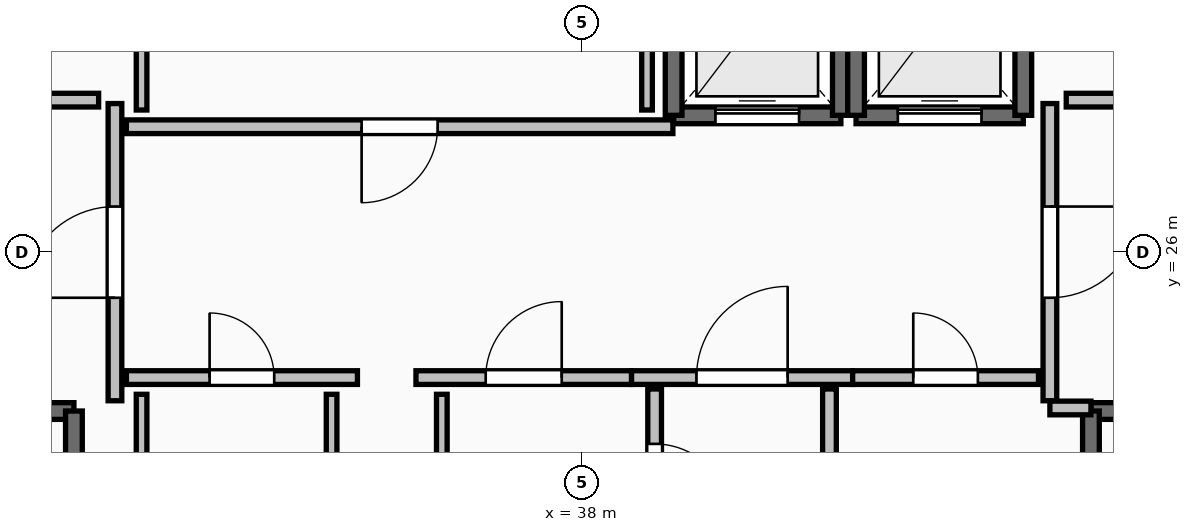
"""IFC4 building model, lengths in metres.
Left out: names, types, materials, properties, quantities, classifications, styles, units other than length and angle.
Written with IfcOpenShell. Run it as: python <this file> out.ifc"""

import sys

from ifc_helpers import new_model, si_unit, direction, frame, frame_2d, origin, place, context, subcontext, project, spatial, rectangle, extrude, element, fill, save


model = new_model("IFC4")
c1 = context("Model", 3, precision=1e-05, world=origin(), true_north=direction((0.0, 1.0)))
c2 = subcontext(c1, "Body", "Model", "MODEL_VIEW")
j1 = project(units=[si_unit("LENGTHUNIT", "METRE"), si_unit("PLANEANGLEUNIT", "RADIAN")], contexts=[c1])
p1 = place(None, origin())
s1 = spatial("IfcSite", under=j1, at=p1, CompositionType="ELEMENT")
p2 = place(p1, origin())
s2 = spatial("IfcBuilding", under=s1, at=p2, CompositionType="ELEMENT")
p3 = place(p2, frame((0.0, 0.0, 266.2)))
s3 = spatial("IfcBuildingStorey", under=s2, at=p3, CompositionType="ELEMENT", Elevation=266.2)
p4 = place(p3, frame((27.94, 23.91, 0.0), z_axis=(0.0, 0.0, 1.0), x_axis=(1.0, 0.0, 0.0)))
e1 = element("IfcWall", 1, at=p4, inside=s3, PredefinedType="SOLIDWALL", context=c2, shape_type="SweptSolid", body=[
    extrude(rectangle(XDim=3.37, YDim=0.22, at=frame_2d((1.685, 0.0))), origin(), (0.0, 0.0, 1.0), 3.29),
])
p5 = place(p4, frame((1.135, 0.0, 0.0)))
e2 = element("IfcOpeningElement", 2, at=p5, cuts=e1, PredefinedType="OPENING", context=c2, shape_type="SweptSolid", body=[
    extrude(rectangle(XDim=1.1, YDim=2.15, at=frame_2d((0.55, 1.075))), frame((0.0, 0.125, 0.0), z_axis=(0.0, -1.0, 0.0), x_axis=(1.0, 0.0, 0.0)), (0.0, 0.0, 1.0), 0.25),
])
p6 = place(p3, frame((31.31, 23.91, 0.0), z_axis=(0.0, 0.0, 1.0), x_axis=(0.0, -1.0, 0.0)))
e3 = element("IfcWall", 3, at=p6, inside=s3, PredefinedType="SOLIDWALL", context=c2, shape_type="SweptSolid", body=[
    extrude(rectangle(XDim=7.42, YDim=0.22, at=frame_2d((3.71, 0.0))), origin(), (0.0, 0.0, 1.0), 3.29),
])
p7 = place(p3, frame((44.69, 23.91, 0.0), z_axis=(0.0, 0.0, 1.0), x_axis=(1.0, 0.0, 0.0)))
e4 = element("IfcWall", 4, at=p7, inside=s3, PredefinedType="SOLIDWALL", context=c2, shape_type="SweptSolid", body=[
    extrude(rectangle(XDim=3.37, YDim=0.22, at=frame_2d((1.685, 0.0))), origin(), (0.0, 0.0, 1.0), 3.29),
])
p8 = place(p7, frame((1.135, 0.0, 0.0)))
e5 = element("IfcOpeningElement", 5, at=p8, cuts=e4, PredefinedType="OPENING", context=c2, shape_type="SweptSolid", body=[
    extrude(rectangle(XDim=1.1, YDim=2.15, at=frame_2d((0.55, 1.075))), frame((0.0, 0.125, 0.0), z_axis=(0.0, -1.0, 0.0), x_axis=(1.0, 0.0, 0.0)), (0.0, 0.0, 1.0), 0.25),
])
p9 = place(p3, frame((44.69, 16.49, 0.0), z_axis=(0.0, 0.0, 1.0), x_axis=(0.0, 1.0, 0.0)))
e6 = element("IfcWall", 6, at=p9, inside=s3, PredefinedType="SOLIDWALL", context=c2, shape_type="SweptSolid", body=[
    extrude(rectangle(XDim=7.42, YDim=0.22, at=frame_2d((3.71, 0.0))), origin(), (0.0, 0.0, 1.0), 3.29),
])
p10 = place(p3, frame((39.2, 27.8, 0.0), z_axis=(0.0, 0.0, 1.0), x_axis=(1.0, 0.0, 0.0)))
e7 = element("IfcWall", 7, at=p10, inside=s3, PredefinedType="SOLIDWALL", context=c2, shape_type="SweptSolid", body=[
    extrude(rectangle(XDim=2.2, YDim=0.22, at=frame_2d((1.1, 0.0))), origin(), (0.0, 0.0, 1.0), 3.29),
])
p11 = place(p10, frame((0.55, 0.0, 0.0)))
e8 = element("IfcOpeningElement", 8, at=p11, cuts=e7, PredefinedType="OPENING", context=c2, shape_type="SweptSolid", body=[
    extrude(rectangle(XDim=1.1, YDim=2.2, at=frame_2d((0.55, 1.1))), frame((0.0, 0.125, 0.0), z_axis=(0.0, -1.0, 0.0), x_axis=(1.0, 0.0, 0.0)), (0.0, 0.0, 1.0), 0.25),
])
for number, where, z_axis, x_axis in (
    (9, (41.4, 27.8, 0.0), (0.0, 0.0, 1.0), (0.0, 1.0, 0.0)),
    (10, (39.2, 30.4, 0.0), (0.0, 0.0, 1.0), (0.0, -1.0, 0.0)),
):
    element("IfcWall", number, at=place(p3, frame(where, z_axis=z_axis, x_axis=x_axis)), inside=s3, PredefinedType="SOLIDWALL", context=c2, shape_type="SweptSolid", body=[
        extrude(rectangle(XDim=2.6, YDim=0.22, at=frame_2d((1.3, 0.0))), origin(), (0.0, 0.0, 1.0), 3.29),
    ])
p12 = place(p3, frame((41.6, 27.8, 0.0), z_axis=(0.0, 0.0, 1.0), x_axis=(1.0, 0.0, 0.0)))
e11 = element("IfcWall", 11, at=p12, inside=s3, PredefinedType="SOLIDWALL", context=c2, shape_type="SweptSolid", body=[
    extrude(rectangle(XDim=2.2, YDim=0.22, at=frame_2d((1.1, 0.0))), origin(), (0.0, 0.0, 1.0), 3.29),
])
p13 = place(p12, frame((0.55, 0.0, 0.0)))
e12 = element("IfcOpeningElement", 12, at=p13, cuts=e11, PredefinedType="OPENING", context=c2, shape_type="SweptSolid", body=[
    extrude(rectangle(XDim=1.1, YDim=2.2, at=frame_2d((0.55, 1.1))), frame((0.0, 0.125, 0.0), z_axis=(0.0, -1.0, 0.0), x_axis=(1.0, 0.0, 0.0)), (0.0, 0.0, 1.0), 0.25),
])
for number, where, z_axis, x_axis in (
    (13, (43.8, 27.8, 0.0), (0.0, 0.0, 1.0), (0.0, 1.0, 0.0)),
    (14, (41.6, 30.4, 0.0), (0.0, 0.0, 1.0), (0.0, -1.0, 0.0)),
):
    element("IfcWall", number, at=place(p3, frame(where, z_axis=z_axis, x_axis=x_axis)), inside=s3, PredefinedType="SOLIDWALL", context=c2, shape_type="SweptSolid", body=[
        extrude(rectangle(XDim=2.6, YDim=0.22, at=frame_2d((1.3, 0.0))), origin(), (0.0, 0.0, 1.0), 3.29),
    ])
p14 = place(p3, frame((31.85, 24.045, 0.0), z_axis=(0.0, 0.0, 1.0), x_axis=(0.0, 1.0, 0.0)))
e15 = element("IfcWall", 15, at=p14, inside=s3, PredefinedType="PARTITIONING", context=c2, shape_type="SweptSolid", body=[
    extrude(rectangle(XDim=3.91, YDim=0.18, at=frame_2d((1.955, 0.0))), origin(), (0.0, 0.0, 1.0), 3.29),
])
p15 = place(p14, frame((1.355, 0.0, 0.0)))
e16 = element("IfcOpeningElement", 16, at=p15, cuts=e15, PredefinedType="OPENING", context=c2, shape_type="SweptSolid", body=[
    extrude(rectangle(XDim=1.2, YDim=2.15, at=frame_2d((0.6, 1.075))), frame((0.0, 0.105, 0.0), z_axis=(0.0, -1.0, 0.0), x_axis=(1.0, 0.0, 0.0)), (0.0, 0.0, 1.0), 0.21),
])
p16 = place(p3, frame((44.15, 27.955, 0.0), z_axis=(0.0, 0.0, 1.0), x_axis=(0.0, -1.0, 0.0)))
e17 = element("IfcWall", 17, at=p16, inside=s3, PredefinedType="PARTITIONING", context=c2, shape_type="SweptSolid", body=[
    extrude(rectangle(XDim=3.91, YDim=0.18, at=frame_2d((1.955, 0.0))), origin(), (0.0, 0.0, 1.0), 3.29),
])
p17 = place(p16, frame((1.355, 0.0, 0.0)))
e18 = element("IfcOpeningElement", 18, at=p17, cuts=e17, PredefinedType="OPENING", context=c2, shape_type="SweptSolid", body=[
    extrude(rectangle(XDim=1.2, YDim=2.15, at=frame_2d((0.6, 1.075))), frame((0.0, 0.105, 0.0), z_axis=(0.0, -1.0, 0.0), x_axis=(1.0, 0.0, 0.0)), (0.0, 0.0, 1.0), 0.21),
])
p18 = place(p3, frame((44.15, 23.95, 0.0), z_axis=(0.0, 0.0, 1.0), x_axis=(1.0, 0.0, 0.0)))
e19 = element("IfcWall", 19, at=p18, inside=s3, PredefinedType="PARTITIONING", context=c2, shape_type="SweptSolid", body=[
    extrude(rectangle(XDim=0.54, YDim=0.18, at=frame_2d((0.27, 0.0))), origin(), (0.0, 0.0, 1.0), 3.29),
])
p19 = place(p3, frame((38.645, 24.35, 0.0), z_axis=(0.0, 0.0, 1.0), x_axis=(1.0, 0.0, 0.0)))
e20 = element("IfcWall", 20, at=p19, inside=s3, PredefinedType="PARTITIONING", context=c2, shape_type="SweptSolid", body=[
    extrude(rectangle(XDim=2.91, YDim=0.18, at=frame_2d((1.455, 0.0))), origin(), (0.0, 0.0, 1.0), 3.29),
])
p20 = place(p19, frame((0.855, 0.0, 0.0)))
e21 = element("IfcOpeningElement", 21, at=p20, cuts=e20, PredefinedType="OPENING", context=c2, shape_type="SweptSolid", body=[
    extrude(rectangle(XDim=1.2, YDim=2.15, at=frame_2d((0.6, 1.075))), frame((0.0, 0.105, 0.0), z_axis=(0.0, -1.0, 0.0), x_axis=(1.0, 0.0, 0.0)), (0.0, 0.0, 1.0), 0.21),
])
p21 = place(p3, frame((41.555, 24.35, 0.0), z_axis=(0.0, 0.0, 1.0), x_axis=(1.0, 0.0, 0.0)))
e22 = element("IfcWall", 22, at=p21, inside=s3, PredefinedType="PARTITIONING", context=c2, shape_type="SweptSolid", body=[
    extrude(rectangle(XDim=2.445, YDim=0.18, at=frame_2d((1.223, 0.0))), origin(), (0.0, 0.0, 1.0), 3.29),
])
p22 = place(p21, frame((0.798, 0.0, 0.0)))
e23 = element("IfcOpeningElement", 23, at=p22, cuts=e22, PredefinedType="OPENING", context=c2, shape_type="SweptSolid", body=[
    extrude(rectangle(XDim=0.85, YDim=2.1, at=frame_2d((0.425, 1.05))), frame((0.0, 0.105, 0.0), z_axis=(0.0, -1.0, 0.0), x_axis=(1.0, 0.0, 0.0)), (0.0, 0.0, 1.0), 0.21),
])
p23 = place(p3, frame((39.19, 27.65, 0.0), z_axis=(0.0, 0.0, 1.0), x_axis=(-1.0, 0.0, 0.0)))
e24 = element("IfcWall", 24, at=p23, inside=s3, PredefinedType="PARTITIONING", context=c2, shape_type="SweptSolid", body=[
    extrude(rectangle(XDim=7.19, YDim=0.18, at=frame_2d((3.595, 0.0))), origin(), (0.0, 0.0, 1.0), 3.29),
])
p24 = place(p23, frame((3.095, 0.0, 0.0)))
e25 = element("IfcOpeningElement", 25, at=p24, cuts=e24, PredefinedType="OPENING", context=c2, shape_type="SweptSolid", body=[
    extrude(rectangle(XDim=1.0, YDim=2.15, at=frame_2d((0.5, 1.075))), frame((0.0, 0.105, 0.0), z_axis=(0.0, -1.0, 0.0), x_axis=(1.0, 0.0, 0.0)), (0.0, 0.0, 1.0), 0.21),
])
p25 = place(p3, frame((32.0, 24.35, 0.0), z_axis=(0.0, 0.0, 1.0), x_axis=(1.0, 0.0, 0.0)))
e26 = element("IfcWall", 26, at=p25, inside=s3, PredefinedType="PARTITIONING", context=c2, shape_type="SweptSolid", body=[
    extrude(rectangle(XDim=3.04, YDim=0.18, at=frame_2d((1.52, 0.0))), origin(), (0.0, 0.0, 1.0), 3.29),
])
p26 = place(p25, frame((1.095, 0.0, 0.0)))
e27 = element("IfcOpeningElement", 27, at=p26, cuts=e26, PredefinedType="OPENING", context=c2, shape_type="SweptSolid", body=[
    extrude(rectangle(XDim=0.85, YDim=2.1, at=frame_2d((0.425, 1.05))), frame((0.0, 0.105, 0.0), z_axis=(0.0, -1.0, 0.0), x_axis=(1.0, 0.0, 0.0)), (0.0, 0.0, 1.0), 0.21),
])
p27 = place(p3, frame((35.81, 24.35, 0.0), z_axis=(0.0, 0.0, 1.0), x_axis=(1.0, 0.0, 0.0)))
e28 = element("IfcWall", 28, at=p27, inside=s3, PredefinedType="PARTITIONING", context=c2, shape_type="SweptSolid", body=[
    extrude(rectangle(XDim=2.835, YDim=0.18, at=frame_2d((1.417, 0.0))), origin(), (0.0, 0.0, 1.0), 3.29),
])
p28 = place(p27, frame((0.917, 0.0, 0.0)))
e29 = element("IfcOpeningElement", 29, at=p28, cuts=e28, PredefinedType="OPENING", context=c2, shape_type="SweptSolid", body=[
    extrude(rectangle(XDim=1.0, YDim=2.15, at=frame_2d((0.5, 1.075))), frame((0.0, 0.105, 0.0), z_axis=(0.0, -1.0, 0.0), x_axis=(1.0, 0.0, 0.0)), (0.0, 0.0, 1.0), 0.21),
])
p29 = place(p3, frame((41.25, 20.305, 0.0), z_axis=(0.0, 0.0, 1.0), x_axis=(0.0, 1.0, 0.0)))
e30 = element("IfcWall", 30, at=p29, inside=s3, PredefinedType="PARTITIONING", context=c2, shape_type="SweptSolid", body=[
    extrude(rectangle(XDim=3.895, YDim=0.18, at=frame_2d((1.948, 0.0))), origin(), (0.0, 0.0, 1.0), 2.482),
])
p30 = place(p29, frame((1.522, 0.0, 0.0)))
e31 = element("IfcOpeningElement", 31, at=p30, cuts=e30, PredefinedType="OPENING", context=c2, shape_type="SweptSolid", body=[
    extrude(rectangle(XDim=0.85, YDim=2.1, at=frame_2d((0.425, 1.05))), frame((0.0, 0.105, 0.0), z_axis=(0.0, -1.0, 0.0), x_axis=(1.0, 0.0, 0.0)), (0.0, 0.0, 1.0), 0.21),
])
p31 = place(p3, frame((38.95, 24.2, 0.0), z_axis=(0.0, 0.0, 1.0), x_axis=(0.0, -1.0, 0.0)))
e32 = element("IfcWall", 32, at=p31, inside=s3, PredefinedType="PARTITIONING", context=c2, shape_type="SweptSolid", body=[
    extrude(rectangle(XDim=2.445, YDim=0.18, at=frame_2d((1.223, 0.0))), origin(), (0.0, 0.0, 1.0), 2.482),
])
p32 = place(p31, frame((0.722, 0.0, 0.0)))
e33 = element("IfcOpeningElement", 33, at=p32, cuts=e32, PredefinedType="OPENING", context=c2, shape_type="SweptSolid", body=[
    extrude(rectangle(XDim=1.0, YDim=2.15, at=frame_2d((0.5, 1.075))), frame((0.0, 0.105, 0.0), z_axis=(0.0, -1.0, 0.0), x_axis=(1.0, 0.0, 0.0)), (0.0, 0.0, 1.0), 0.21),
])
for number, where, z_axis, x_axis in (
    (34, (31.635, 28.0, 0.0), (0.0, 0.0, 1.0), (-1.0, 0.0, 0.0)),
    (35, (45.28, 28.0, 0.0), (0.0, 0.0, 1.0), (-1.0, 0.0, 0.0)),
):
    element("IfcWall", number, at=place(p3, frame(where, z_axis=z_axis, x_axis=x_axis)), inside=s3, PredefinedType="PARTITIONING", context=c2, shape_type="SweptSolid", body=[
        extrude(rectangle(XDim=0.915, YDim=0.18, at=frame_2d((0.458, 0.0))), origin(), (0.0, 0.0, 1.0), 3.29),
    ])
for number, where, z_axis, x_axis in (
    (36, (32.2, 30.26, 0.0), (0.0, 0.0, 1.0), (0.0, -1.0, 0.0)),
    (37, (38.85, 27.87, 0.0), (0.0, 0.0, 1.0), (0.0, 1.0, 0.0)),
):
    element("IfcWall", number, at=place(p3, frame(where, z_axis=z_axis, x_axis=x_axis)), inside=s3, PredefinedType="PARTITIONING", context=c2, shape_type="SweptSolid", body=[
        extrude(rectangle(XDim=2.39, YDim=0.14, at=frame_2d((1.195, 0.0))), origin(), (0.0, 0.0, 1.0), 3.29),
    ])
for number, where, z_axis, x_axis in (
    (38, (32.2, 24.13, 0.0), (0.0, 0.0, 1.0), (0.0, -1.0, 0.0)),
    (39, (34.7, 21.67, 0.0), (0.0, 0.0, 1.0), (0.0, 1.0, 0.0)),
    (40, (36.15, 24.13, 0.0), (0.0, 0.0, 1.0), (0.0, -1.0, 0.0)),
):
    element("IfcWall", number, at=place(p3, frame(where, z_axis=z_axis, x_axis=x_axis)), inside=s3, PredefinedType="PARTITIONING", context=c2, shape_type="SweptSolid", body=[
        extrude(rectangle(XDim=2.46, YDim=0.14, at=frame_2d((1.23, 0.0))), origin(), (0.0, 0.0, 1.0), 2.482),
    ])
p33 = place(p11, origin())
e41 = element("IfcDoor", 41, at=p33, inside=s3, OperationType="SLIDING_TO_LEFT", PredefinedType="DOOR", context=c2, shape_type="SweptSolid", body=[
    extrude(rectangle(XDim=1.1, YDim=2.2, at=frame_2d((0.55, 1.1))), frame((0.0, 0.025, 0.0), z_axis=(0.0, -1.0, 0.0), x_axis=(1.0, 0.0, 0.0)), (0.0, 0.0, 1.0), 0.05),
])
fill(e8, e41)
p34 = place(p13, origin())
e42 = element("IfcDoor", 42, at=p34, inside=s3, OperationType="SLIDING_TO_LEFT", PredefinedType="DOOR", context=c2, shape_type="SweptSolid", body=[
    extrude(rectangle(XDim=1.1, YDim=2.2, at=frame_2d((0.55, 1.1))), frame((0.0, 0.025, 0.0), z_axis=(0.0, -1.0, 0.0), x_axis=(1.0, 0.0, 0.0)), (0.0, 0.0, 1.0), 0.05),
])
fill(e12, e42)
p35 = place(p15, origin())
e43 = element("IfcDoor", 43, at=p35, inside=s3, OperationType="SINGLE_SWING_LEFT", PredefinedType="DOOR", context=c2, shape_type="SweptSolid", body=[
    extrude(rectangle(XDim=1.2, YDim=2.15, at=frame_2d((0.6, 1.075))), frame((0.0, 0.025, 0.0), z_axis=(0.0, -1.0, 0.0), x_axis=(1.0, 0.0, 0.0)), (0.0, 0.0, 1.0), 0.05),
])
fill(e16, e43)
p36 = place(p17, origin())
e44 = element("IfcDoor", 44, at=p36, inside=s3, OperationType="SINGLE_SWING_LEFT", PredefinedType="DOOR", context=c2, shape_type="SweptSolid", body=[
    extrude(rectangle(XDim=1.2, YDim=2.15, at=frame_2d((0.6, 1.075))), frame((0.0, 0.025, 0.0), z_axis=(0.0, -1.0, 0.0), x_axis=(1.0, 0.0, 0.0)), (0.0, 0.0, 1.0), 0.05),
])
fill(e18, e44)
p37 = place(p20, origin())
e45 = element("IfcDoor", 45, at=p37, inside=s3, OperationType="SINGLE_SWING_RIGHT", PredefinedType="DOOR", context=c2, shape_type="SweptSolid", body=[
    extrude(rectangle(XDim=1.2, YDim=2.15, at=frame_2d((0.6, 1.075))), frame((0.0, 0.025, 0.0), z_axis=(0.0, -1.0, 0.0), x_axis=(1.0, 0.0, 0.0)), (0.0, 0.0, 1.0), 0.05),
])
fill(e21, e45)
p38 = place(p22, origin())
e46 = element("IfcDoor", 46, at=p38, inside=s3, OperationType="SINGLE_SWING_LEFT", PredefinedType="DOOR", context=c2, shape_type="SweptSolid", body=[
    extrude(rectangle(XDim=0.85, YDim=2.1, at=frame_2d((0.425, 1.05))), frame((0.0, 0.025, 0.0), z_axis=(0.0, -1.0, 0.0), x_axis=(1.0, 0.0, 0.0)), (0.0, 0.0, 1.0), 0.05),
])
fill(e23, e46)
p39 = place(p24, origin())
e47 = element("IfcDoor", 47, at=p39, inside=s3, OperationType="SINGLE_SWING_RIGHT", PredefinedType="DOOR", context=c2, shape_type="SweptSolid", body=[
    extrude(rectangle(XDim=1.0, YDim=2.15, at=frame_2d((0.5, 1.075))), frame((0.0, 0.025, 0.0), z_axis=(0.0, -1.0, 0.0), x_axis=(1.0, 0.0, 0.0)), (0.0, 0.0, 1.0), 0.05),
])
fill(e25, e47)
p40 = place(p26, origin())
e48 = element("IfcDoor", 48, at=p40, inside=s3, OperationType="SINGLE_SWING_LEFT", PredefinedType="DOOR", context=c2, shape_type="SweptSolid", body=[
    extrude(rectangle(XDim=0.85, YDim=2.1, at=frame_2d((0.425, 1.05))), frame((0.0, 0.025, 0.0), z_axis=(0.0, -1.0, 0.0), x_axis=(1.0, 0.0, 0.0)), (0.0, 0.0, 1.0), 0.05),
])
fill(e27, e48)
p41 = place(p28, origin())
e49 = element("IfcDoor", 49, at=p41, inside=s3, OperationType="SINGLE_SWING_RIGHT", PredefinedType="DOOR", context=c2, shape_type="SweptSolid", body=[
    extrude(rectangle(XDim=1.0, YDim=2.15, at=frame_2d((0.5, 1.075))), frame((0.0, 0.025, 0.0), z_axis=(0.0, -1.0, 0.0), x_axis=(1.0, 0.0, 0.0)), (0.0, 0.0, 1.0), 0.05),
])
fill(e29, e49)
p42 = place(p32, origin())
e50 = element("IfcDoor", 50, at=p42, inside=s3, OperationType="SINGLE_SWING_RIGHT", PredefinedType="DOOR", context=c2, shape_type="SweptSolid", body=[
    extrude(rectangle(XDim=1.0, YDim=2.15, at=frame_2d((0.5, 1.075))), frame((0.0, 0.025, 0.0), z_axis=(0.0, -1.0, 0.0), x_axis=(1.0, 0.0, 0.0)), (0.0, 0.0, 1.0), 0.05),
])
fill(e33, e50)
save(model, sys.argv[1])
